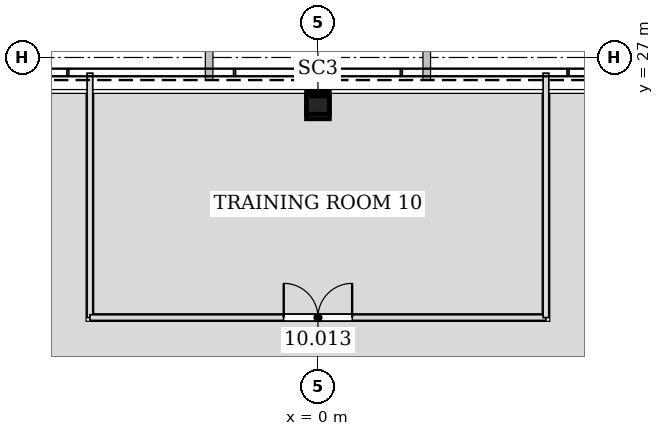
"""IFC4 building model, lengths in metres.
Left out: names, types, materials, properties, quantities, classifications, styles, units other than length and angle.
Written with IfcOpenShell. Run it as: python <this file> out.ifc"""

import sys

from ifc_helpers import new_model, si_unit, direction, frame, frame_2d, origin, origin_2d, place, context, subcontext, project, spatial, rectangle, hollow_rectangle, extrude, element, fill, save


model = new_model("IFC4")
c1 = context("Model", 3, precision=1e-05, world=origin(), true_north=direction((0.0, 1.0)))
c2 = subcontext(c1, "Body", "Model", "MODEL_VIEW")
j1 = project(units=[si_unit("LENGTHUNIT", "METRE"), si_unit("PLANEANGLEUNIT", "RADIAN")], contexts=[c1])
p1 = place(None, origin())
s1 = spatial("IfcSite", under=j1, at=p1, CompositionType="ELEMENT")
p2 = place(p1, origin())
s2 = spatial("IfcBuilding", under=s1, at=p2, CompositionType="ELEMENT")
p3 = place(p2, frame((0.0, 0.0, 49.8)))
s3 = spatial("IfcBuildingStorey", under=s2, at=p3, CompositionType="ELEMENT", Elevation=49.8)
p4 = place(p3, frame((0.0, 25.806, 0.0), z_axis=(0.0, -0.028297679255, 0.99959954049), x_axis=(1.0, 0.0, 0.0)))
e1 = element("IfcColumn", 1, at=p4, inside=s3, PredefinedType="COLUMN", context=c2, shape_type="SweptSolid", body=[
    extrude(hollow_rectangle(XDim=0.6, YDim=0.6, WallThickness=0.032, at=origin_2d()), origin(), (0.0, 0.0, 1.0), 4.202),
])
p5 = place(p3, frame((-6.0, 26.588, 0.0), z_axis=(0.0, 0.0, 1.0), x_axis=(0.0, -1.0, 0.0)))
e2 = element("IfcWall", 2, at=p5, inside=s3, PredefinedType="PARTITIONING", context=c2, shape_type="SweptSolid", body=[
    extrude(rectangle(XDim=6.432, YDim=0.15, at=frame_2d((3.216, 0.0))), origin(), (0.0, 0.0, 1.0), 3.418),
])
p6 = place(p3, frame((-6.0, 20.156, 0.0), z_axis=(0.0, 0.0, 1.0), x_axis=(1.0, 0.0, 0.0)))
e3 = element("IfcWall", 3, at=p6, inside=s3, PredefinedType="PARTITIONING", context=c2, shape_type="SweptSolid", body=[
    extrude(rectangle(XDim=12.0, YDim=0.15, at=frame_2d((6.0, 0.0))), origin(), (0.0, 0.0, 1.0), 2.984),
])
p7 = place(p6, frame((5.1, 0.0, 0.0)))
e4 = element("IfcOpeningElement", 4, at=p7, cuts=e3, PredefinedType="OPENING", context=c2, shape_type="SweptSolid", body=[
    extrude(rectangle(XDim=1.8, YDim=2.4, at=frame_2d((0.9, 1.2))), frame((0.0, 0.085, 0.0), z_axis=(0.0, -1.0, 0.0), x_axis=(1.0, 0.0, 0.0)), (0.0, 0.0, 1.0), 0.17),
])
p8 = place(p3, frame((6.0, 20.156, 0.0), z_axis=(0.0, 0.0, 1.0), x_axis=(0.0, 1.0, 0.0)))
e5 = element("IfcWall", 5, at=p8, inside=s3, PredefinedType="PARTITIONING", context=c2, shape_type="SweptSolid", body=[
    extrude(rectangle(XDim=6.432, YDim=0.15, at=frame_2d((3.216, 0.0))), origin(), (0.0, 0.0, 1.0), 3.418),
])
p9 = place(p7, origin())
e6 = element("IfcDoor", 6, at=p9, inside=s3, OperationType="DOUBLE_DOOR_SINGLE_SWING", PredefinedType="DOOR", context=c2, shape_type="SweptSolid", body=[
    extrude(rectangle(XDim=1.8, YDim=2.4, at=frame_2d((0.9, 1.2))), frame((0.0, 0.025, 0.0), z_axis=(0.0, -1.0, 0.0), x_axis=(1.0, 0.0, 0.0)), (0.0, 0.0, 1.0), 0.05),
])
fill(e4, e6)
save(model, sys.argv[1])
